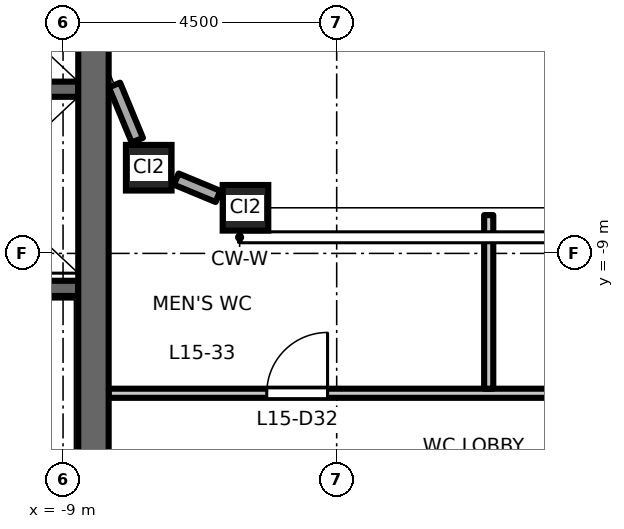
"""IFC4 building model, lengths in metres.
Left out: names, types, materials, properties, quantities, classifications, styles, units other than length and angle.
Written with IfcOpenShell. Run it as: python <this file> out.ifc"""

import sys

from ifc_helpers import new_model, si_unit, direction, frame, frame_2d, origin, origin_2d, place, context, subcontext, project, spatial, rectangle, hollow_rectangle, extrude, element, fill, save


model = new_model("IFC4")
c1 = context("Model", 3, precision=1e-05, world=origin(), true_north=direction((0.0, 1.0)))
c2 = subcontext(c1, "Body", "Model", "MODEL_VIEW")
j1 = project(units=[si_unit("LENGTHUNIT", "METRE"), si_unit("PLANEANGLEUNIT", "RADIAN")], contexts=[c1])
p1 = place(None, origin())
s1 = spatial("IfcSite", under=j1, at=p1, CompositionType="ELEMENT")
p2 = place(p1, origin())
s2 = spatial("IfcBuilding", under=s1, at=p2, CompositionType="ELEMENT")
p3 = place(p2, frame((0.0, 0.0, 71.7)))
s3 = spatial("IfcBuildingStorey", under=s2, at=p3, CompositionType="ELEMENT", Elevation=71.7)
for number, where, z_axis, x_axis in (
    (1, (-7.591, -7.591, 0.0), (0.0, 0.0, 1.0), (1.0, 0.0, 0.0)),
    (2, (-6.0, -8.25, 0.0), (0.0, 0.0, 1.0), (1.0, 0.0, 0.0)),
):
    element("IfcColumn", number, at=place(p3, frame(where, z_axis=z_axis, x_axis=x_axis)), inside=s3, PredefinedType="COLUMN", context=c2, shape_type="SweptSolid", body=[
        extrude(hollow_rectangle(XDim=0.75, YDim=0.75, WallThickness=0.045, at=origin_2d()), origin(), (0.0, 0.0, 1.0), 4.5),
    ])
p4 = place(p3, frame((-8.75, -6.3, 0.0), z_axis=(0.0, 0.0, 1.0), x_axis=(-1.0, 0.0, 0.0)))
e3 = element("IfcWall", 3, at=p4, inside=s3, PredefinedType="SHEAR", context=c2, shape_type="SweptSolid", body=[
    extrude(rectangle(XDim=3.1, YDim=0.25, at=frame_2d((1.55, 0.0))), origin(), (0.0, 0.0, 1.0), 4.35),
])
p5 = place(p3, frame((-8.75, -9.575, 0.0), z_axis=(0.0, 0.0, 1.0), x_axis=(-1.0, 0.0, 0.0)))
e4 = element("IfcWall", 4, at=p5, inside=s3, PredefinedType="SHEAR", context=c2, shape_type="SweptSolid", body=[
    extrude(rectangle(XDim=8.0, YDim=0.25, at=frame_2d((4.0, 0.0))), origin(), (0.0, 0.0, 1.0), 4.35),
])
p6 = place(p5, frame((6.65, 0.0, 0.0)))
e5 = element("IfcOpeningElement", 5, at=p6, cuts=e4, PredefinedType="OPENING", context=c2, shape_type="SweptSolid", body=[
    extrude(rectangle(XDim=1.1, YDim=2.1, at=frame_2d((0.55, 1.05))), frame((0.0, 0.135, 0.0), z_axis=(0.0, -1.0, 0.0), x_axis=(1.0, 0.0, 0.0)), (0.0, 0.0, 1.0), 0.27),
])
p7 = place(p3, frame((-8.5, -13.0, 0.0), z_axis=(0.0, 0.0, 1.0), x_axis=(0.0, 1.0, 0.0)))
e6 = element("IfcWall", 6, at=p7, inside=s3, PredefinedType="SHEAR", context=c2, shape_type="SweptSolid", body=[
    extrude(rectangle(XDim=26.0, YDim=0.5, at=frame_2d((13.0, 0.0))), origin(), (0.0, 0.0, 1.0), 4.35),
])
p8 = place(p3, frame((-8.154, -6.231, 0.0), z_axis=(0.0, 0.0, 1.0), x_axis=(0.382549378284, -0.923935048136, 0.0)))
e7 = element("IfcWall", 7, at=p8, inside=s3, PredefinedType="STANDARD", context=c2, shape_type="SweptSolid", body=[
    extrude(rectangle(XDim=0.982, YDim=0.2, at=frame_2d((0.491, 0.0))), origin(), (0.0, 0.0, 1.0), 3.73),
])
p9 = place(p3, frame((-7.138, -7.779, 0.0), z_axis=(0.0, 0.0, 1.0), x_axis=(0.923940677943, -0.382535780864, 0.0)))
e8 = element("IfcWall", 8, at=p9, inside=s3, PredefinedType="STANDARD", context=c2, shape_type="SweptSolid", body=[
    extrude(rectangle(XDim=0.742, YDim=0.2, at=frame_2d((0.371, 0.0))), origin(), (0.0, 0.0, 1.0), 3.73),
])
p10 = place(p3, frame((-8.25, -11.3, 0.0), z_axis=(0.0, 0.0, 1.0), x_axis=(1.0, 0.0, 0.0)))
e9 = element("IfcWall", 9, at=p10, inside=s3, PredefinedType="PARTITIONING", context=c2, shape_type="SweptSolid", body=[
    extrude(rectangle(XDim=15.05, YDim=0.15, at=frame_2d((7.525, 0.0))), origin(), (0.0, 0.0, 1.0), 4.35),
])
p11 = place(p10, frame((2.6, 0.0, 0.0)))
e10 = element("IfcOpeningElement", 10, at=p11, cuts=e9, PredefinedType="OPENING", context=c2, shape_type="SweptSolid", body=[
    extrude(rectangle(XDim=1.0, YDim=2.1, at=frame_2d((0.5, 1.05))), frame((0.0, 0.085, 0.0), z_axis=(0.0, -1.0, 0.0), x_axis=(1.0, 0.0, 0.0)), (0.0, 0.0, 1.0), 0.17),
])
p12 = place(p10, frame((8.85, 0.0, 0.0)))
e11 = element("IfcOpeningElement", 11, at=p12, cuts=e9, PredefinedType="OPENING", context=c2, shape_type="SweptSolid", body=[
    extrude(rectangle(XDim=1.0, YDim=2.1, at=frame_2d((0.5, 1.05))), frame((0.0, 0.085, 0.0), z_axis=(0.0, -1.0, 0.0), x_axis=(1.0, 0.0, 0.0)), (0.0, 0.0, 1.0), 0.17),
])
p13 = place(p10, frame((13.4, 0.0, 0.0)))
e12 = element("IfcOpeningElement", 12, at=p13, cuts=e9, PredefinedType="OPENING", context=c2, shape_type="SweptSolid", body=[
    extrude(rectangle(XDim=1.0, YDim=2.1, at=frame_2d((0.5, 1.05))), frame((0.0, 0.085, 0.0), z_axis=(0.0, -1.0, 0.0), x_axis=(1.0, 0.0, 0.0)), (0.0, 0.0, 1.0), 0.17),
])
p14 = place(p3, frame((-2.0, -11.225, 0.0), z_axis=(0.0, 0.0, 1.0), x_axis=(0.0, 1.0, 0.0)))
e13 = element("IfcWall", 13, at=p14, inside=s3, PredefinedType="PARTITIONING", context=c2, shape_type="SweptSolid", body=[
    extrude(rectangle(XDim=2.855, YDim=0.15, at=frame_2d((1.427, 0.0))), origin(), (0.0, 0.0, 1.0), 4.35),
])
p15 = place(p11, origin())
e14 = element("IfcDoor", 14, at=p15, inside=s3, OperationType="SINGLE_SWING_RIGHT", PredefinedType="DOOR", context=c2, shape_type="SweptSolid", body=[
    extrude(rectangle(XDim=1.0, YDim=2.1, at=frame_2d((0.5, 1.05))), frame((0.0, 0.025, 0.0), z_axis=(0.0, -1.0, 0.0), x_axis=(1.0, 0.0, 0.0)), (0.0, 0.0, 1.0), 0.05),
])
fill(e10, e14)
save(model, sys.argv[1])
